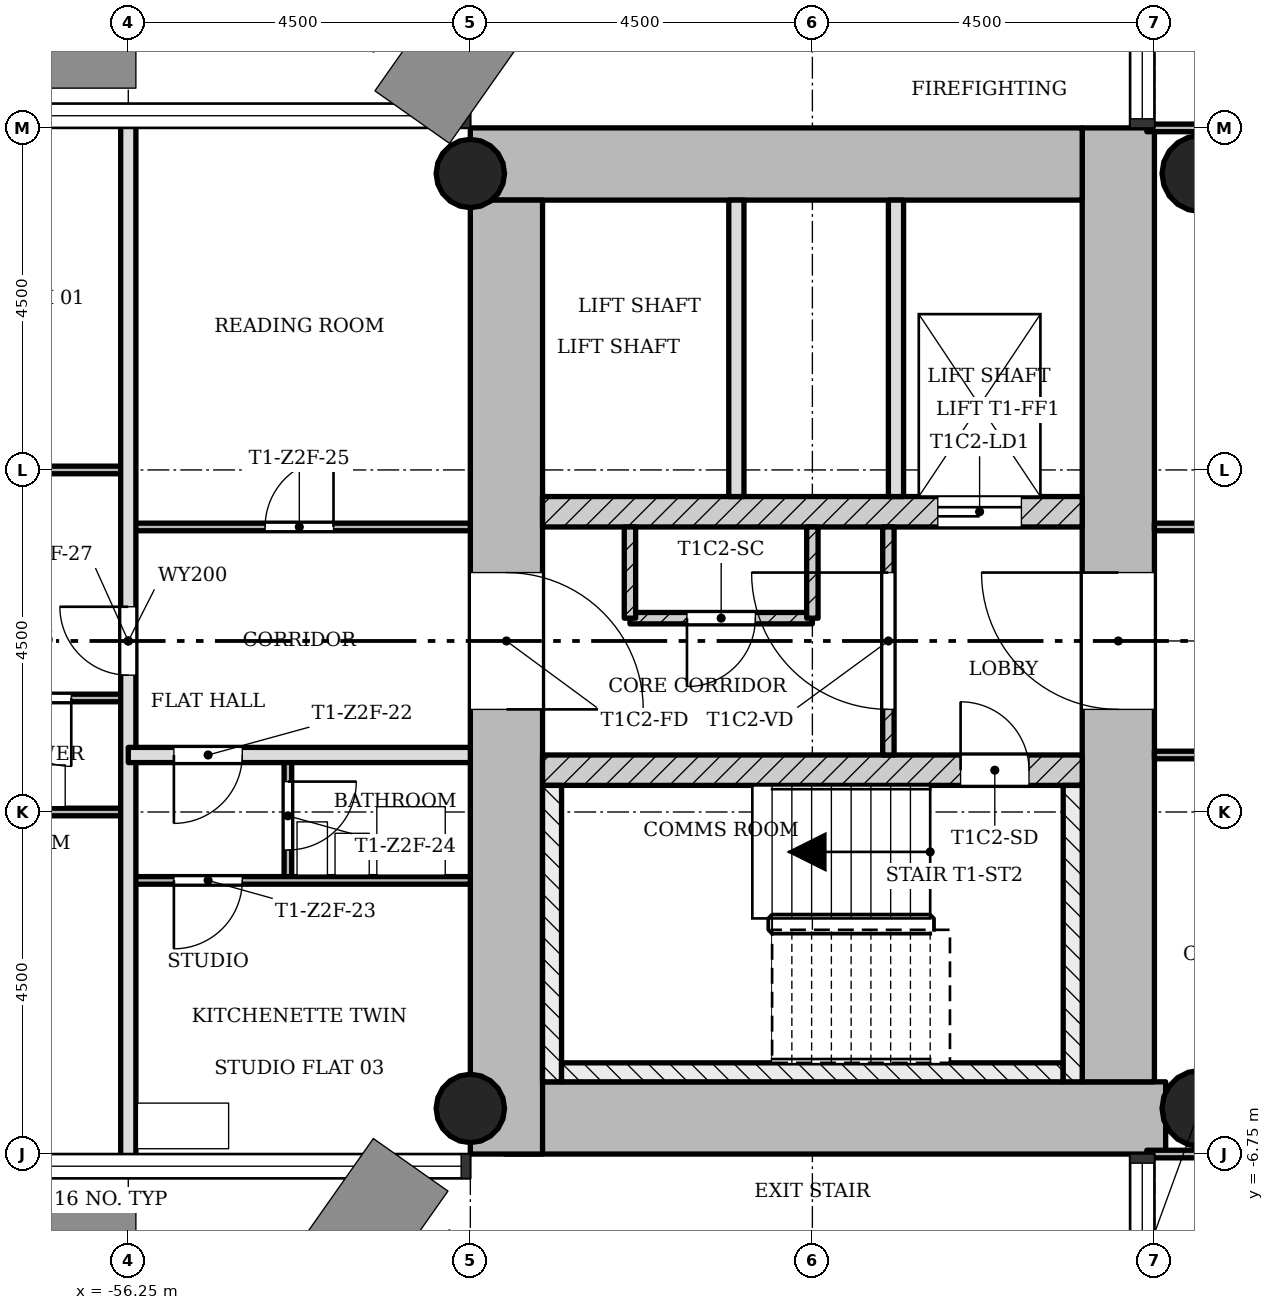
"""IFC4 building model, lengths in metres.
Left out: names, types, materials, properties, quantities, classifications, styles, units other than length and angle.
Written with IfcOpenShell. Run it as: python <this file> out.ifc"""

import sys

from ifc_helpers import new_model, si_unit, direction, frame, frame_2d, origin, origin_2d, place, context, subcontext, project, spatial, rectangle, hollow_circle, extrude, element, fill, save


model = new_model("IFC4")
c1 = context("Model", 3, precision=1e-05, world=origin(), true_north=direction((0.0, 1.0)))
c2 = subcontext(c1, "Body", "Model", "MODEL_VIEW")
j1 = project(units=[si_unit("LENGTHUNIT", "METRE"), si_unit("PLANEANGLEUNIT", "RADIAN")], contexts=[c1])
p1 = place(None, origin())
s1 = spatial("IfcSite", under=j1, at=p1, CompositionType="ELEMENT")
p2 = place(p1, origin())
s2 = spatial("IfcBuilding", under=s1, at=p2, CompositionType="ELEMENT")
p3 = place(p2, frame((0.0, 0.0, 107.2)))
s3 = spatial("IfcBuildingStorey", under=s2, at=p3, CompositionType="ELEMENT", Elevation=107.2)
p4 = place(p3, frame((-51.298, -6.275, 0.0), z_axis=(0.0, 0.0, 1.0), x_axis=(1.0, 0.0, 0.0)))
e1 = element("IfcWall", 1, at=p4, inside=s3, PredefinedType="SHEAR", context=c2, shape_type="SweptSolid", body=[
    extrude(rectangle(XDim=8.696, YDim=0.95, at=frame_2d((4.348, 0.0))), origin(), (0.0, 0.0, 1.0), 3.4),
])
p5 = place(p3, frame((-43.225, -5.8, 0.0), z_axis=(0.0, 0.0, 1.0), x_axis=(0.0, 1.0, 0.0)))
e2 = element("IfcWall", 2, at=p5, inside=s3, PredefinedType="SHEAR", context=c2, shape_type="SweptSolid", body=[
    extrude(rectangle(XDim=12.55, YDim=0.95, at=frame_2d((6.275, 0.0))), origin(), (0.0, 0.0, 1.0), 3.4),
])
p6 = place(p5, frame((4.9, 0.0, 0.0)))
e3 = element("IfcOpeningElement", 3, at=p6, cuts=e2, PredefinedType="OPENING", context=c2, shape_type="SweptSolid", body=[
    extrude(rectangle(XDim=1.8, YDim=2.1, at=frame_2d((0.9, 1.05))), frame((0.0, 0.485, 0.0), z_axis=(0.0, -1.0, 0.0), x_axis=(1.0, 0.0, 0.0)), (0.0, 0.0, 1.0), 0.97),
])
p7 = place(p3, frame((-43.7, 6.275, 0.0), z_axis=(0.0, 0.0, 1.0), x_axis=(-1.0, 0.0, 0.0)))
e4 = element("IfcWall", 4, at=p7, inside=s3, PredefinedType="SHEAR", context=c2, shape_type="SweptSolid", body=[
    extrude(rectangle(XDim=8.05, YDim=0.95, at=frame_2d((4.025, 0.0))), origin(), (0.0, 0.0, 1.0), 3.4),
])
p8 = place(p3, frame((-51.275, 5.8, 0.0), z_axis=(0.0, 0.0, 1.0), x_axis=(0.0, -1.0, 0.0)))
e5 = element("IfcWall", 5, at=p8, inside=s3, PredefinedType="SHEAR", context=c2, shape_type="SweptSolid", body=[
    extrude(rectangle(XDim=12.55, YDim=0.95, at=frame_2d((6.275, 0.0))), origin(), (0.0, 0.0, 1.0), 3.4),
])
p9 = place(p8, frame((4.9, 0.0, 0.0)))
e6 = element("IfcOpeningElement", 6, at=p9, cuts=e5, PredefinedType="OPENING", context=c2, shape_type="SweptSolid", body=[
    extrude(rectangle(XDim=1.8, YDim=2.1, at=frame_2d((0.9, 1.05))), frame((0.0, 0.485, 0.0), z_axis=(0.0, -1.0, 0.0), x_axis=(1.0, 0.0, 0.0)), (0.0, 0.0, 1.0), 0.97),
])
p10 = place(p3, frame((-50.8, -1.7, 0.0), z_axis=(0.0, 0.0, 1.0), x_axis=(1.0, 0.0, 0.0)))
e7 = element("IfcWall", 7, at=p10, inside=s3, PredefinedType="SHEAR", context=c2, shape_type="SweptSolid", body=[
    extrude(rectangle(XDim=7.1, YDim=0.4, at=frame_2d((3.55, 0.0))), origin(), (0.0, 0.0, 1.0), 3.4),
])
p11 = place(p10, frame((5.5, 0.0, 0.0)))
e8 = element("IfcOpeningElement", 8, at=p11, cuts=e7, PredefinedType="OPENING", context=c2, shape_type="SweptSolid", body=[
    extrude(rectangle(XDim=0.9, YDim=2.1, at=frame_2d((0.45, 1.05))), frame((0.0, 0.21, 0.0), z_axis=(0.0, -1.0, 0.0), x_axis=(1.0, 0.0, 0.0)), (0.0, 0.0, 1.0), 0.42),
])
p12 = place(p3, frame((-50.8, 1.7, 0.0), z_axis=(0.0, 0.0, 1.0), x_axis=(1.0, 0.0, 0.0)))
e9 = element("IfcWall", 9, at=p12, inside=s3, PredefinedType="SHEAR", context=c2, shape_type="SweptSolid", body=[
    extrude(rectangle(XDim=7.1, YDim=0.4, at=frame_2d((3.55, 0.0))), origin(), (0.0, 0.0, 1.0), 3.4),
])
p13 = place(p12, frame((5.2, 0.0, 0.0)))
e10 = element("IfcOpeningElement", 10, at=p13, cuts=e9, PredefinedType="OPENING", context=c2, shape_type="SweptSolid", body=[
    extrude(rectangle(XDim=1.1, YDim=2.1, at=frame_2d((0.55, 1.05))), frame((0.0, 0.21, 0.0), z_axis=(0.0, -1.0, 0.0), x_axis=(1.0, 0.0, 0.0)), (0.0, 0.0, 1.0), 0.42),
])
for number, where, z_axis, x_axis in (
    (11, (-51.75, -6.15, 0.0), (0.0, 0.0, 1.0), (1.0, 0.0, 0.0)),
    (12, (-51.75, 6.15, 0.0), (0.0, 0.0, 1.0), (1.0, 0.0, 0.0)),
):
    element("IfcColumn", number, at=place(p3, frame(where, z_axis=z_axis, x_axis=x_axis)), inside=s3, PredefinedType="COLUMN", context=c2, shape_type="SweptSolid", body=[
        extrude(hollow_circle(Radius=0.45, WallThickness=0.032, at=origin_2d()), origin(), (0.0, 0.0, 1.0), 3.4),
    ])
for number, where, z_axis, x_axis in (
    (13, (-42.15, -6.15, 0.0), (0.0, 0.0, 1.0), (1.0, 0.0, 0.0)),
    (14, (-42.15, 6.15, 0.0), (0.0, 0.0, 1.0), (1.0, 0.0, 0.0)),
):
    element("IfcColumn", number, at=place(p3, frame(where, z_axis=z_axis, x_axis=x_axis)), inside=s3, PredefinedType="COLUMN", context=c2, shape_type="SweptSolid", body=[
        extrude(hollow_circle(Radius=0.5, WallThickness=0.036, at=origin_2d()), origin(), (0.0, 0.0, 1.0), 3.4),
    ])
p14 = place(p3, frame((-46.25, 1.5, 0.0), z_axis=(0.0, 0.0, 1.0), x_axis=(0.0, -1.0, 0.0)))
e15 = element("IfcWall", 15, at=p14, inside=s3, PredefinedType="PARTITIONING", context=c2, shape_type="SweptSolid", body=[
    extrude(rectangle(XDim=3.0, YDim=0.15, at=frame_2d((1.5, 0.0))), origin(), (0.0, 0.0, 1.0), 3.0),
])
p15 = place(p14, frame((0.6, 0.0, 0.0)))
e16 = element("IfcOpeningElement", 16, at=p15, cuts=e15, PredefinedType="OPENING", context=c2, shape_type="SweptSolid", body=[
    extrude(rectangle(XDim=1.8, YDim=2.1, at=frame_2d((0.9, 1.05))), frame((0.0, 0.085, 0.0), z_axis=(0.0, -1.0, 0.0), x_axis=(1.0, 0.0, 0.0)), (0.0, 0.0, 1.0), 0.17),
])
for number, where, z_axis, x_axis in (
    (17, (-46.15, 5.8, 0.0), (0.0, 0.0, 1.0), (0.0, -1.0, 0.0)),
    (18, (-48.25, 5.8, 0.0), (0.0, 0.0, 1.0), (0.0, -1.0, 0.0)),
):
    element("IfcWall", number, at=place(p3, frame(where, z_axis=z_axis, x_axis=x_axis)), inside=s3, PredefinedType="SOLIDWALL", context=c2, shape_type="SweptSolid", body=[
        extrude(rectangle(XDim=3.9, YDim=0.2, at=frame_2d((1.95, 0.0))), origin(), (0.0, 0.0, 1.0), 3.0),
    ])
p16 = place(p3, frame((-47.25, 0.3, 0.0), z_axis=(0.0, 0.0, 1.0), x_axis=(-1.0, 0.0, 0.0)))
e19 = element("IfcWall", 19, at=p16, inside=s3, PredefinedType="PARTITIONING", context=c2, shape_type="SweptSolid", body=[
    extrude(rectangle(XDim=2.4, YDim=0.15, at=frame_2d((1.2, 0.0))), origin(), (0.0, 0.0, 1.0), 3.0),
])
p17 = place(p16, frame((0.75, 0.0, 0.0)))
e20 = element("IfcOpeningElement", 20, at=p17, cuts=e19, PredefinedType="OPENING", context=c2, shape_type="SweptSolid", body=[
    extrude(rectangle(XDim=0.9, YDim=2.1, at=frame_2d((0.45, 1.05))), frame((0.0, 0.085, 0.0), z_axis=(0.0, -1.0, 0.0), x_axis=(1.0, 0.0, 0.0)), (0.0, 0.0, 1.0), 0.17),
])
for number, where, z_axis, x_axis in (
    (21, (-47.25, 0.3, 0.0), (0.0, 0.0, 1.0), (0.0, 1.0, 0.0)),
    (22, (-49.65, 0.3, 0.0), (0.0, 0.0, 1.0), (0.0, 1.0, 0.0)),
):
    element("IfcWall", number, at=place(p3, frame(where, z_axis=z_axis, x_axis=x_axis)), inside=s3, PredefinedType="PARTITIONING", context=c2, shape_type="SweptSolid", body=[
        extrude(rectangle(XDim=1.2, YDim=0.15, at=frame_2d((0.6, 0.0))), origin(), (0.0, 0.0, 1.0), 3.0),
    ])
p18 = place(p3, frame((-56.25, -6.85, 0.0), z_axis=(0.0, 0.0, 1.0), x_axis=(0.0, 1.0, 0.0)))
e23 = element("IfcWall", 23, at=p18, inside=s3, PredefinedType="SOLIDWALL", context=c2, shape_type="SweptSolid", body=[
    extrude(rectangle(XDim=13.7, YDim=0.2, at=frame_2d((6.85, 0.0))), origin(), (0.0, 0.0, 1.0), 3.0),
])
p19 = place(p18, frame((6.4, 0.0, 0.0)))
e24 = element("IfcOpeningElement", 24, at=p19, cuts=e23, PredefinedType="OPENING", context=c2, shape_type="SweptSolid", body=[
    extrude(rectangle(XDim=0.9, YDim=2.1, at=frame_2d((0.45, 1.05))), frame((0.0, 0.11, 0.0), z_axis=(0.0, -1.0, 0.0), x_axis=(1.0, 0.0, 0.0)), (0.0, 0.0, 1.0), 0.22),
])
p20 = place(p3, frame((-54.15, -3.15, 0.0), z_axis=(0.0, 0.0, 1.0), x_axis=(0.0, 1.0, 0.0)))
e25 = element("IfcWall", 25, at=p20, inside=s3, PredefinedType="PARTITIONING", context=c2, shape_type="SweptSolid", body=[
    extrude(rectangle(XDim=1.65, YDim=0.1, at=frame_2d((0.825, 0.0))), origin(), (0.0, 0.0, 1.0), 3.0),
])
p21 = place(p20, frame((0.4, 0.0, 0.0)))
e26 = element("IfcOpeningElement", 26, at=p21, cuts=e25, PredefinedType="OPENING", context=c2, shape_type="SweptSolid", body=[
    extrude(rectangle(XDim=0.9, YDim=2.1, at=frame_2d((0.45, 1.05))), frame((0.0, 0.06, 0.0), z_axis=(0.0, -1.0, 0.0), x_axis=(1.0, 0.0, 0.0)), (0.0, 0.0, 1.0), 0.12),
])
p22 = place(p3, frame((-42.85, -6.75, 0.0), z_axis=(0.0, 0.0, 1.0), x_axis=(1.0, 0.0, 0.0)))
e27 = element("IfcWall", 27, at=p22, inside=s3, PredefinedType="PARTITIONING", context=c2, shape_type="SweptSolid", body=[
    extrude(rectangle(XDim=5.95, YDim=0.1, at=frame_2d((2.975, 0.0))), origin(), (0.0, 0.0, 1.0), 3.0),
])
p23 = place(p3, frame((-56.25, -3.15, 0.0), z_axis=(0.0, 0.0, 1.0), x_axis=(1.0, 0.0, 0.0)))
e28 = element("IfcWall", 28, at=p23, inside=s3, PredefinedType="PARTITIONING", context=c2, shape_type="SweptSolid", body=[
    extrude(rectangle(XDim=4.5, YDim=0.1, at=frame_2d((2.25, 0.0))), origin(), (0.0, 0.0, 1.0), 3.0),
])
p24 = place(p23, frame((0.6, 0.0, 0.0)))
e29 = element("IfcOpeningElement", 29, at=p24, cuts=e28, PredefinedType="OPENING", context=c2, shape_type="SweptSolid", body=[
    extrude(rectangle(XDim=0.9, YDim=2.1, at=frame_2d((0.45, 1.05))), frame((0.0, 0.06, 0.0), z_axis=(0.0, -1.0, 0.0), x_axis=(1.0, 0.0, 0.0)), (0.0, 0.0, 1.0), 0.12),
])
p25 = place(p3, frame((-60.85, -2.25, 0.0), z_axis=(0.0, 0.0, 1.0), x_axis=(1.0, 0.0, 0.0)))
e30 = element("IfcWall", 30, at=p25, inside=s3, PredefinedType="PARTITIONING", context=c2, shape_type="SweptSolid", body=[
    extrude(rectangle(XDim=4.6, YDim=0.1, at=frame_2d((2.3, 0.0))), origin(), (0.0, 0.0, 1.0), 3.0),
])
p26 = place(p25, frame((1.25, 0.0, 0.0)))
e31 = element("IfcOpeningElement", 31, at=p26, cuts=e30, PredefinedType="OPENING", context=c2, shape_type="SweptSolid", body=[
    extrude(rectangle(XDim=0.9, YDim=2.1, at=frame_2d((0.45, 1.05))), frame((0.0, 0.06, 0.0), z_axis=(0.0, -1.0, 0.0), x_axis=(1.0, 0.0, 0.0)), (0.0, 0.0, 1.0), 0.12),
])
p27 = place(p3, frame((-42.75, -1.5, 0.0), z_axis=(0.0, 0.0, 1.0), x_axis=(1.0, 0.0, 0.0)))
e32 = element("IfcWall", 32, at=p27, inside=s3, PredefinedType="PARTITIONING", context=c2, shape_type="SweptSolid", body=[
    extrude(rectangle(XDim=5.85, YDim=0.1, at=frame_2d((2.925, 0.0))), origin(), (0.0, 0.0, 1.0), 3.0),
])
p28 = place(p27, frame((0.975, 0.0, 0.0)))
e33 = element("IfcOpeningElement", 33, at=p28, cuts=e32, PredefinedType="OPENING", context=c2, shape_type="SweptSolid", body=[
    extrude(rectangle(XDim=0.9, YDim=2.1, at=frame_2d((0.45, 1.05))), frame((0.0, 0.06, 0.0), z_axis=(0.0, -1.0, 0.0), x_axis=(1.0, 0.0, 0.0)), (0.0, 0.0, 1.0), 0.12),
])
p29 = place(p3, frame((-56.25, -1.5, 0.0), z_axis=(0.0, 0.0, 1.0), x_axis=(1.0, 0.0, 0.0)))
e34 = element("IfcWall", 34, at=p29, inside=s3, PredefinedType="SOLIDWALL", context=c2, shape_type="SweptSolid", body=[
    extrude(rectangle(XDim=4.5, YDim=0.2, at=frame_2d((2.25, 0.0))), origin(), (0.0, 0.0, 1.0), 3.0),
])
p30 = place(p29, frame((0.6, 0.0, 0.0)))
e35 = element("IfcOpeningElement", 35, at=p30, cuts=e34, PredefinedType="OPENING", context=c2, shape_type="SweptSolid", body=[
    extrude(rectangle(XDim=0.9, YDim=2.1, at=frame_2d((0.45, 1.05))), frame((0.0, 0.11, 0.0), z_axis=(0.0, -1.0, 0.0), x_axis=(1.0, 0.0, 0.0)), (0.0, 0.0, 1.0), 0.22),
])
p31 = place(p3, frame((-58.65, -0.75, 0.0), z_axis=(0.0, 0.0, 1.0), x_axis=(1.0, 0.0, 0.0)))
e36 = element("IfcWall", 36, at=p31, inside=s3, PredefinedType="PARTITIONING", context=c2, shape_type="SweptSolid", body=[
    extrude(rectangle(XDim=2.4, YDim=0.1, at=frame_2d((1.2, 0.0))), origin(), (0.0, 0.0, 1.0), 3.0),
])
p32 = place(p31, frame((0.75, 0.0, 0.0)))
e37 = element("IfcOpeningElement", 37, at=p32, cuts=e36, PredefinedType="OPENING", context=c2, shape_type="SweptSolid", body=[
    extrude(rectangle(XDim=0.9, YDim=2.1, at=frame_2d((0.45, 1.05))), frame((0.0, 0.06, 0.0), z_axis=(0.0, -1.0, 0.0), x_axis=(1.0, 0.0, 0.0)), (0.0, 0.0, 1.0), 0.12),
])
p33 = place(p3, frame((-56.25, 1.5, 0.0), z_axis=(0.0, 0.0, 1.0), x_axis=(1.0, 0.0, 0.0)))
e38 = element("IfcWall", 38, at=p33, inside=s3, PredefinedType="PARTITIONING", context=c2, shape_type="SweptSolid", body=[
    extrude(rectangle(XDim=4.5, YDim=0.1, at=frame_2d((2.25, 0.0))), origin(), (0.0, 0.0, 1.0), 3.0),
])
p34 = place(p33, frame((1.8, 0.0, 0.0)))
e39 = element("IfcOpeningElement", 39, at=p34, cuts=e38, PredefinedType="OPENING", context=c2, shape_type="SweptSolid", body=[
    extrude(rectangle(XDim=0.9, YDim=2.1, at=frame_2d((0.45, 1.05))), frame((0.0, 0.06, 0.0), z_axis=(0.0, -1.0, 0.0), x_axis=(1.0, 0.0, 0.0)), (0.0, 0.0, 1.0), 0.12),
])
p35 = place(p3, frame((-42.75, 1.5, 0.0), z_axis=(0.0, 0.0, 1.0), x_axis=(1.0, 0.0, 0.0)))
e40 = element("IfcWall", 40, at=p35, inside=s3, PredefinedType="PARTITIONING", context=c2, shape_type="SweptSolid", body=[
    extrude(rectangle(XDim=5.85, YDim=0.1, at=frame_2d((2.925, 0.0))), origin(), (0.0, 0.0, 1.0), 3.0),
])
p36 = place(p35, frame((1.575, 0.0, 0.0)))
e41 = element("IfcOpeningElement", 41, at=p36, cuts=e40, PredefinedType="OPENING", context=c2, shape_type="SweptSolid", body=[
    extrude(rectangle(XDim=0.9, YDim=2.1, at=frame_2d((0.45, 1.05))), frame((0.0, 0.06, 0.0), z_axis=(0.0, -1.0, 0.0), x_axis=(1.0, 0.0, 0.0)), (0.0, 0.0, 1.0), 0.12),
])
p37 = place(p3, frame((-60.85, 2.25, 0.0), z_axis=(0.0, 0.0, 1.0), x_axis=(1.0, 0.0, 0.0)))
e42 = element("IfcWall", 42, at=p37, inside=s3, PredefinedType="PARTITIONING", context=c2, shape_type="SweptSolid", body=[
    extrude(rectangle(XDim=4.6, YDim=0.1, at=frame_2d((2.3, 0.0))), origin(), (0.0, 0.0, 1.0), 3.0),
])
p38 = place(p37, frame((1.9, 0.0, 0.0)))
e43 = element("IfcOpeningElement", 43, at=p38, cuts=e42, PredefinedType="OPENING", context=c2, shape_type="SweptSolid", body=[
    extrude(rectangle(XDim=0.9, YDim=2.1, at=frame_2d((0.45, 1.05))), frame((0.0, 0.06, 0.0), z_axis=(0.0, -1.0, 0.0), x_axis=(1.0, 0.0, 0.0)), (0.0, 0.0, 1.0), 0.12),
])
p39 = place(p3, frame((-42.85, 6.75, 0.0), z_axis=(0.0, 0.0, 1.0), x_axis=(1.0, 0.0, 0.0)))
e44 = element("IfcWall", 44, at=p39, inside=s3, PredefinedType="PARTITIONING", context=c2, shape_type="SweptSolid", body=[
    extrude(rectangle(XDim=5.95, YDim=0.1, at=frame_2d((2.975, 0.0))), origin(), (0.0, 0.0, 1.0), 3.0),
])
p40 = place(p3, frame((-50.675, -1.9, 0.0), z_axis=(0.0, 0.0, 1.0), x_axis=(0.0, -1.0, 0.0)))
e45 = element("IfcWall", 45, at=p40, inside=s3, PredefinedType="SHEAR", context=c2, shape_type="SweptSolid", body=[
    extrude(rectangle(XDim=3.9, YDim=0.25, at=frame_2d((1.95, 0.0))), origin(), (0.0, 0.0, 1.0), 3.4),
])
p41 = place(p3, frame((-43.95, -5.675, 0.0), z_axis=(0.0, 0.0, 1.0), x_axis=(-1.0, 0.0, 0.0)))
e46 = element("IfcWall", 46, at=p41, inside=s3, PredefinedType="SHEAR", context=c2, shape_type="SweptSolid", body=[
    extrude(rectangle(XDim=6.6, YDim=0.25, at=frame_2d((3.3, 0.0))), origin(), (0.0, 0.0, 1.0), 3.4),
])
p42 = place(p3, frame((-43.825, -1.9, 0.0), z_axis=(0.0, 0.0, 1.0), x_axis=(0.0, -1.0, 0.0)))
e47 = element("IfcWall", 47, at=p42, inside=s3, PredefinedType="SHEAR", context=c2, shape_type="SweptSolid", body=[
    extrude(rectangle(XDim=3.9, YDim=0.25, at=frame_2d((1.95, 0.0))), origin(), (0.0, 0.0, 1.0), 3.4),
])
p43 = place(p15, origin())
e48 = element("IfcDoor", 48, at=p43, inside=s3, OperationType="SINGLE_SWING_LEFT", PredefinedType="DOOR", context=c2, shape_type="SweptSolid", body=[
    extrude(rectangle(XDim=1.8, YDim=2.1, at=frame_2d((0.9, 1.05))), frame((0.0, 0.025, 0.0), z_axis=(0.0, -1.0, 0.0), x_axis=(1.0, 0.0, 0.0)), (0.0, 0.0, 1.0), 0.05),
])
fill(e16, e48)
p44 = place(p17, origin())
e49 = element("IfcDoor", 49, at=p44, inside=s3, OperationType="SINGLE_SWING_LEFT", PredefinedType="DOOR", context=c2, shape_type="SweptSolid", body=[
    extrude(rectangle(XDim=0.9, YDim=2.1, at=frame_2d((0.45, 1.05))), frame((0.0, 0.025, 0.0), z_axis=(0.0, -1.0, 0.0), x_axis=(1.0, 0.0, 0.0)), (0.0, 0.0, 1.0), 0.05),
])
fill(e20, e49)
p45 = place(p30, origin())
e50 = element("IfcDoor", 50, at=p45, inside=s3, OperationType="SINGLE_SWING_LEFT", PredefinedType="DOOR", context=c2, shape_type="SweptSolid", body=[
    extrude(rectangle(XDim=0.9, YDim=2.1, at=frame_2d((0.45, 1.05))), frame((0.0, 0.025, 0.0), z_axis=(0.0, -1.0, 0.0), x_axis=(1.0, 0.0, 0.0)), (0.0, 0.0, 1.0), 0.05),
])
fill(e35, e50)
p46 = place(p24, origin())
e51 = element("IfcDoor", 51, at=p46, inside=s3, OperationType="SINGLE_SWING_LEFT", PredefinedType="DOOR", context=c2, shape_type="SweptSolid", body=[
    extrude(rectangle(XDim=0.9, YDim=2.1, at=frame_2d((0.45, 1.05))), frame((0.0, 0.025, 0.0), z_axis=(0.0, -1.0, 0.0), x_axis=(1.0, 0.0, 0.0)), (0.0, 0.0, 1.0), 0.05),
])
fill(e29, e51)
p47 = place(p21, origin())
e52 = element("IfcDoor", 52, at=p47, inside=s3, OperationType="SINGLE_SWING_RIGHT", PredefinedType="DOOR", context=c2, shape_type="SweptSolid", body=[
    extrude(rectangle(XDim=0.9, YDim=2.1, at=frame_2d((0.45, 1.05))), frame((0.0, 0.025, 0.0), z_axis=(0.0, -1.0, 0.0), x_axis=(1.0, 0.0, 0.0)), (0.0, 0.0, 1.0), 0.05),
])
fill(e26, e52)
p48 = place(p34, origin())
e53 = element("IfcDoor", 53, at=p48, inside=s3, OperationType="SINGLE_SWING_LEFT", PredefinedType="DOOR", context=c2, shape_type="SweptSolid", body=[
    extrude(rectangle(XDim=0.9, YDim=2.1, at=frame_2d((0.45, 1.05))), frame((0.0, 0.025, 0.0), z_axis=(0.0, -1.0, 0.0), x_axis=(1.0, 0.0, 0.0)), (0.0, 0.0, 1.0), 0.05),
])
fill(e39, e53)
p49 = place(p32, origin())
e54 = element("IfcDoor", 54, at=p49, inside=s3, OperationType="SINGLE_SWING_RIGHT", PredefinedType="DOOR", context=c2, shape_type="SweptSolid", body=[
    extrude(rectangle(XDim=0.9, YDim=2.1, at=frame_2d((0.45, 1.05))), frame((0.0, 0.025, 0.0), z_axis=(0.0, -1.0, 0.0), x_axis=(1.0, 0.0, 0.0)), (0.0, 0.0, 1.0), 0.05),
])
fill(e37, e54)
p50 = place(p19, origin())
e55 = element("IfcDoor", 55, at=p50, inside=s3, OperationType="SINGLE_SWING_LEFT", PredefinedType="DOOR", context=c2, shape_type="SweptSolid", body=[
    extrude(rectangle(XDim=0.9, YDim=2.1, at=frame_2d((0.45, 1.05))), frame((0.0, 0.025, 0.0), z_axis=(0.0, -1.0, 0.0), x_axis=(1.0, 0.0, 0.0)), (0.0, 0.0, 1.0), 0.05),
])
fill(e24, e55)
p51 = place(p11, origin())
e56 = element("IfcDoor", 56, at=p51, inside=s3, OperationType="SINGLE_SWING_RIGHT", PredefinedType="DOOR", context=c2, shape_type="SweptSolid", body=[
    extrude(rectangle(XDim=0.9, YDim=2.1, at=frame_2d((0.45, 1.05))), frame((0.0, 0.025, 0.0), z_axis=(0.0, -1.0, 0.0), x_axis=(1.0, 0.0, 0.0)), (0.0, 0.0, 1.0), 0.05),
])
fill(e8, e56)
p52 = place(p13, origin())
e57 = element("IfcDoor", 57, at=p52, inside=s3, OperationType="SLIDING_TO_LEFT", PredefinedType="DOOR", context=c2, shape_type="SweptSolid", body=[
    extrude(rectangle(XDim=1.1, YDim=2.1, at=frame_2d((0.55, 1.05))), frame((0.0, 0.025, 0.0), z_axis=(0.0, -1.0, 0.0), x_axis=(1.0, 0.0, 0.0)), (0.0, 0.0, 1.0), 0.05),
])
fill(e10, e57)
p53 = place(p6, origin())
e58 = element("IfcDoor", 58, at=p53, inside=s3, OperationType="SINGLE_SWING_LEFT", PredefinedType="DOOR", context=c2, shape_type="SweptSolid", body=[
    extrude(rectangle(XDim=1.8, YDim=2.1, at=frame_2d((0.9, 1.05))), frame((0.0, 0.025, 0.0), z_axis=(0.0, -1.0, 0.0), x_axis=(1.0, 0.0, 0.0)), (0.0, 0.0, 1.0), 0.05),
])
fill(e3, e58)
p54 = place(p9, origin())
e59 = element("IfcDoor", 59, at=p54, inside=s3, OperationType="SINGLE_SWING_LEFT", PredefinedType="DOOR", context=c2, shape_type="SweptSolid", body=[
    extrude(rectangle(XDim=1.8, YDim=2.1, at=frame_2d((0.9, 1.05))), frame((0.0, 0.025, 0.0), z_axis=(0.0, -1.0, 0.0), x_axis=(1.0, 0.0, 0.0)), (0.0, 0.0, 1.0), 0.05),
])
fill(e6, e59)
save(model, sys.argv[1])
